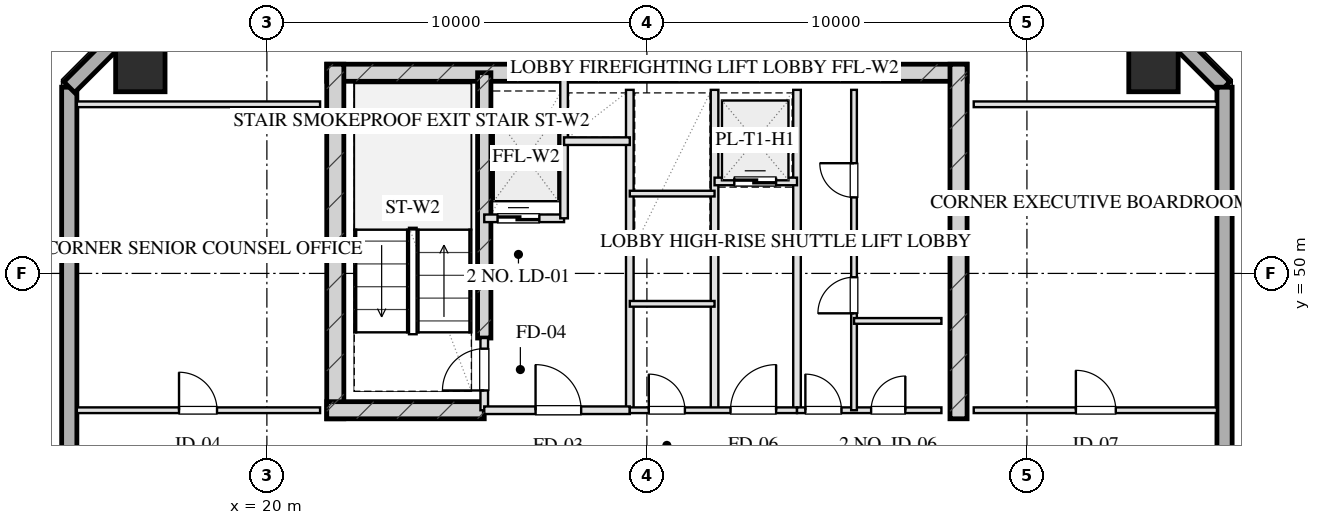
"""IFC4 building model, lengths in metres.
Left out: names, types, materials, properties, quantities, classifications, styles, units other than length and angle.
Written with IfcOpenShell. Run it as: python <this file> out.ifc"""

import sys

from ifc_helpers import new_model, si_unit, direction, frame, frame_2d, origin, origin_2d, place, context, subcontext, project, spatial, rectangle, hollow_rectangle, extrude, element, fill, save


model = new_model("IFC4")
c1 = context("Model", 3, precision=1e-05, world=origin(), true_north=direction((0.0, 1.0)))
c2 = subcontext(c1, "Body", "Model", "MODEL_VIEW")
j1 = project(units=[si_unit("LENGTHUNIT", "METRE"), si_unit("PLANEANGLEUNIT", "RADIAN")], contexts=[c1])
p1 = place(None, origin())
s1 = spatial("IfcSite", under=j1, at=p1, CompositionType="ELEMENT")
p2 = place(p1, origin())
s2 = spatial("IfcBuilding", under=s1, at=p2, CompositionType="ELEMENT")
p3 = place(p2, frame((0.0, 0.0, 250.4)))
s3 = spatial("IfcBuildingStorey", under=s2, at=p3, CompositionType="ELEMENT", Elevation=250.4)
p4 = place(p3, frame((21.575, 55.28, 0.0), z_axis=(0.0, 0.0, 1.0), x_axis=(1.0, 0.0, 0.0)))
e1 = element("IfcWall", 1, at=p4, inside=s3, PredefinedType="SHEAR", context=c2, shape_type="SweptSolid", body=[
    extrude(rectangle(XDim=16.85, YDim=0.45, at=frame_2d((8.425, 0.0))), origin(), (0.0, 0.0, 1.0), 3.2),
])
for number, where, z_axis, x_axis in (
    (2, (21.8, 46.175, 0.0), (0.0, 0.0, 1.0), (0.0, 1.0, 0.0)),
    (3, (38.2, 46.175, 0.0), (0.0, 0.0, 1.0), (0.0, 1.0, 0.0)),
):
    element("IfcWall", number, at=place(p3, frame(where, z_axis=z_axis, x_axis=x_axis)), inside=s3, PredefinedType="SHEAR", context=c2, shape_type="SweptSolid", body=[
        extrude(rectangle(XDim=9.33, YDim=0.45, at=frame_2d((4.665, 0.0))), origin(), (0.0, 0.0, 1.0), 3.2),
    ])
p5 = place(p3, frame((25.72, 48.3, 0.0), z_axis=(0.0, 0.0, 1.0), x_axis=(0.0, 1.0, 0.0)))
e4 = element("IfcWall", 4, at=p5, inside=s3, PredefinedType="SHEAR", context=c2, shape_type="SweptSolid", body=[
    extrude(rectangle(XDim=6.98, YDim=0.35, at=frame_2d((3.49, 0.0))), origin(), (0.0, 0.0, 1.0), 3.2),
])
p6 = place(p3, frame((21.575, 46.4, 0.0), z_axis=(0.0, 0.0, 1.0), x_axis=(1.0, 0.0, 0.0)))
e5 = element("IfcWall", 5, at=p6, inside=s3, PredefinedType="SHEAR", context=c2, shape_type="SweptSolid", body=[
    extrude(rectangle(XDim=4.145, YDim=0.45, at=frame_2d((2.073, 0.0))), origin(), (0.0, 0.0, 1.0), 3.2),
])
for number, where, z_axis, x_axis in (
    (6, (43.33, 55.43, 0.0), (0.0, 0.0, 1.0), (1.0, 0.0, 0.0)),
    (7, (16.67, 55.43, 0.0), (0.0, 0.0, 1.0), (1.0, 0.0, 0.0)),
):
    element("IfcColumn", number, at=place(p3, frame(where, z_axis=z_axis, x_axis=x_axis)), inside=s3, PredefinedType="COLUMN", context=c2, shape_type="SweptSolid", body=[
        extrude(hollow_rectangle(XDim=1.3, YDim=1.3, WallThickness=0.045, at=origin_2d()), origin(), (0.0, 0.0, 1.0), 3.201),
    ])
p7 = place(p3, frame((14.8, 13.1, 0.0), z_axis=(0.0, 0.0, 1.0), x_axis=(0.0, 1.0, 0.0)))
e8 = element("IfcWall", 8, at=p7, inside=s3, PredefinedType="SOLIDWALL", context=c2, shape_type="SweptSolid", body=[
    extrude(rectangle(XDim=41.8, YDim=0.4, at=frame_2d((20.9, 0.0))), origin(), (0.0, 0.0, 1.0), 2.36),
])
p8 = place(p7, frame((22.525, 0.0, 0.75)))
e9 = element("IfcOpeningElement", 9, at=p8, cuts=e8, PredefinedType="OPENING", context=c2, shape_type="SweptSolid", body=[
    extrude(rectangle(XDim=1.95, YDim=1.21, at=frame_2d((0.975, 0.605))), frame((0.0, 0.21, 0.0), z_axis=(0.0, -1.0, 0.0), x_axis=(1.0, 0.0, 0.0)), (0.0, 0.0, 1.0), 0.42),
])
p9 = place(p7, frame((26.325, 0.0, 0.75)))
e10 = element("IfcOpeningElement", 10, at=p9, cuts=e8, PredefinedType="OPENING", context=c2, shape_type="SweptSolid", body=[
    extrude(rectangle(XDim=1.95, YDim=1.21, at=frame_2d((0.975, 0.605))), frame((0.0, 0.21, 0.0), z_axis=(0.0, -1.0, 0.0), x_axis=(1.0, 0.0, 0.0)), (0.0, 0.0, 1.0), 0.42),
])
p10 = place(p7, frame((17.25, 0.0, 0.0)))
e11 = element("IfcOpeningElement", 11, at=p10, cuts=e8, PredefinedType="OPENING", context=c2, shape_type="SweptSolid", body=[
    extrude(rectangle(XDim=1.1, YDim=2.15, at=frame_2d((0.55, 1.075))), frame((0.0, 0.21, 0.0), z_axis=(0.0, -1.0, 0.0), x_axis=(1.0, 0.0, 0.0)), (0.0, 0.0, 1.0), 0.42),
])
for number, where, z_axis, x_axis in (
    (12, (14.8, 54.9, 0.0), (0.0, 0.0, 1.0), (0.707, 0.707, 0.0)),
    (13, (42.8, 57.3, 0.0), (0.0, 0.0, 1.0), (0.707, -0.707, 0.0)),
):
    element("IfcWall", number, at=place(p3, frame(where, z_axis=z_axis, x_axis=x_axis)), inside=s3, PredefinedType="SOLIDWALL", context=c2, shape_type="SweptSolid", body=[
        extrude(rectangle(XDim=3.394, YDim=0.4, at=frame_2d((1.697, 0.0))), origin(), (0.0, 0.0, 1.0), 2.36),
    ])
p11 = place(p3, frame((45.2, 54.9, 0.0), z_axis=(0.0, 0.0, 1.0), x_axis=(0.0, -1.0, 0.0)))
e14 = element("IfcWall", 14, at=p11, inside=s3, PredefinedType="SOLIDWALL", context=c2, shape_type="SweptSolid", body=[
    extrude(rectangle(XDim=41.8, YDim=0.4, at=frame_2d((20.9, 0.0))), origin(), (0.0, 0.0, 1.0), 2.36),
])
p12 = place(p11, frame((17.325, 0.0, 0.75)))
e15 = element("IfcOpeningElement", 15, at=p12, cuts=e14, PredefinedType="OPENING", context=c2, shape_type="SweptSolid", body=[
    extrude(rectangle(XDim=1.95, YDim=1.21, at=frame_2d((0.975, 0.605))), frame((0.0, 0.21, 0.0), z_axis=(0.0, -1.0, 0.0), x_axis=(1.0, 0.0, 0.0)), (0.0, 0.0, 1.0), 0.42),
])
p13 = place(p11, frame((13.525, 0.0, 0.75)))
e16 = element("IfcOpeningElement", 16, at=p13, cuts=e14, PredefinedType="OPENING", context=c2, shape_type="SweptSolid", body=[
    extrude(rectangle(XDim=1.95, YDim=1.21, at=frame_2d((0.975, 0.605))), frame((0.0, 0.21, 0.0), z_axis=(0.0, -1.0, 0.0), x_axis=(1.0, 0.0, 0.0)), (0.0, 0.0, 1.0), 0.42),
])
p14 = place(p11, frame((26.15, 0.0, 0.0)))
e17 = element("IfcOpeningElement", 17, at=p14, cuts=e14, PredefinedType="OPENING", context=c2, shape_type="SweptSolid", body=[
    extrude(rectangle(XDim=1.1, YDim=2.15, at=frame_2d((0.55, 1.075))), frame((0.0, 0.21, 0.0), z_axis=(0.0, -1.0, 0.0), x_axis=(1.0, 0.0, 0.0)), (0.0, 0.0, 1.0), 0.42),
])
p15 = place(p3, frame((25.72, 46.4, 0.0), z_axis=(0.0, 0.0, 1.0), x_axis=(0.0, 1.0, 0.0)))
e18 = element("IfcWall", 18, at=p15, inside=s3, PredefinedType="PARTITIONING", context=c2, shape_type="SweptSolid", body=[
    extrude(rectangle(XDim=1.9, YDim=0.2, at=frame_2d((0.95, 0.0))), origin(), (0.0, 0.0, 1.0), 2.925),
])
p16 = place(p15, frame((0.52, 0.0, 0.0)))
e19 = element("IfcOpeningElement", 19, at=p16, cuts=e18, PredefinedType="OPENING", context=c2, shape_type="SweptSolid", body=[
    extrude(rectangle(XDim=1.1, YDim=2.05, at=frame_2d((0.55, 1.025))), frame((0.0, 0.11, 0.0), z_axis=(0.0, -1.0, 0.0), x_axis=(1.0, 0.0, 0.0)), (0.0, 0.0, 1.0), 0.22),
])
p17 = place(p3, frame((29.55, 46.4, 0.0), z_axis=(0.0, 0.0, 1.0), x_axis=(0.0, 1.0, 0.0)))
e20 = element("IfcWall", 20, at=p17, inside=s3, PredefinedType="PARTITIONING", context=c2, shape_type="SweptSolid", body=[
    extrude(rectangle(XDim=8.43, YDim=0.2, at=frame_2d((4.215, 0.0))), origin(), (0.0, 0.0, 1.0), 2.925),
])
p18 = place(p3, frame((25.72, 46.4, 0.0), z_axis=(0.0, 0.0, 1.0), x_axis=(1.0, 0.0, 0.0)))
e21 = element("IfcWall", 21, at=p18, inside=s3, PredefinedType="PARTITIONING", context=c2, shape_type="SweptSolid", body=[
    extrude(rectangle(XDim=3.83, YDim=0.2, at=frame_2d((1.915, 0.0))), origin(), (0.0, 0.0, 1.0), 2.925),
])
p19 = place(p18, frame((1.35, 0.0, 0.0)))
e22 = element("IfcOpeningElement", 22, at=p19, cuts=e21, PredefinedType="OPENING", context=c2, shape_type="SweptSolid", body=[
    extrude(rectangle(XDim=1.2, YDim=2.05, at=frame_2d((0.6, 1.025))), frame((0.0, 0.11, 0.0), z_axis=(0.0, -1.0, 0.0), x_axis=(1.0, 0.0, 0.0)), (0.0, 0.0, 1.0), 0.22),
])
p20 = place(p3, frame((25.72, 51.45, 0.0), z_axis=(0.0, 0.0, 1.0), x_axis=(1.0, 0.0, 0.0)))
e23 = element("IfcWall", 23, at=p20, inside=s3, PredefinedType="PARTITIONING", context=c2, shape_type="SweptSolid", body=[
    extrude(rectangle(XDim=2.1, YDim=0.2, at=frame_2d((1.05, 0.0))), origin(), (0.0, 0.0, 1.0), 2.925),
])
p21 = place(p20, frame((0.35, 0.0, 0.0)))
e24 = element("IfcOpeningElement", 24, at=p21, cuts=e23, PredefinedType="OPENING", context=c2, shape_type="SweptSolid", body=[
    extrude(rectangle(XDim=1.1, YDim=2.05, at=frame_2d((0.55, 1.025))), frame((0.0, 0.11, 0.0), z_axis=(0.0, -1.0, 0.0), x_axis=(1.0, 0.0, 0.0)), (0.0, 0.0, 1.0), 0.22),
])
p22 = place(p3, frame((27.82, 51.45, 0.0), z_axis=(0.0, 0.0, 1.0), x_axis=(0.0, 1.0, 0.0)))
e25 = element("IfcWall", 25, at=p22, inside=s3, PredefinedType="PARTITIONING", context=c2, shape_type="SweptSolid", body=[
    extrude(rectangle(XDim=3.7, YDim=0.2, at=frame_2d((1.85, 0.0))), origin(), (0.0, 0.0, 1.0), 2.925),
])
p23 = place(p3, frame((27.82, 53.48, 0.0), z_axis=(0.0, 0.0, 1.0), x_axis=(1.0, 0.0, 0.0)))
e26 = element("IfcWall", 26, at=p23, inside=s3, PredefinedType="PARTITIONING", context=c2, shape_type="SweptSolid", body=[
    extrude(rectangle(XDim=1.73, YDim=0.2, at=frame_2d((0.865, 0.0))), origin(), (0.0, 0.0, 1.0), 2.925),
])
for number, where, z_axis, x_axis in (
    (27, (33.95, 46.4, 0.0), (0.0, 0.0, 1.0), (0.0, 1.0, 0.0)),
    (28, (31.78, 46.4, 0.0), (0.0, 0.0, 1.0), (0.0, 1.0, 0.0)),
):
    element("IfcWall", number, at=place(p3, frame(where, z_axis=z_axis, x_axis=x_axis)), inside=s3, PredefinedType="PARTITIONING", context=c2, shape_type="SweptSolid", body=[
        extrude(rectangle(XDim=8.43, YDim=0.2, at=frame_2d((4.215, 0.0))), origin(), (0.0, 0.0, 1.0), 2.925),
    ])
p24 = place(p3, frame((29.55, 46.4, 0.0), z_axis=(0.0, 0.0, 1.0), x_axis=(1.0, 0.0, 0.0)))
e29 = element("IfcWall", 29, at=p24, inside=s3, PredefinedType="PARTITIONING", context=c2, shape_type="SweptSolid", body=[
    extrude(rectangle(XDim=4.4, YDim=0.15, at=frame_2d((2.2, 0.0))), origin(), (0.0, 0.0, 1.0), 2.925),
])
p25 = place(p24, frame((0.5, 0.0, 0.0)))
e30 = element("IfcOpeningElement", 30, at=p25, cuts=e29, PredefinedType="OPENING", context=c2, shape_type="SweptSolid", body=[
    extrude(rectangle(XDim=0.95, YDim=2.05, at=frame_2d((0.475, 1.025))), frame((0.0, 0.085, 0.0), z_axis=(0.0, -1.0, 0.0), x_axis=(1.0, 0.0, 0.0)), (0.0, 0.0, 1.0), 0.17),
])
p26 = place(p24, frame((2.65, 0.0, 0.0)))
e31 = element("IfcOpeningElement", 31, at=p26, cuts=e29, PredefinedType="OPENING", context=c2, shape_type="SweptSolid", body=[
    extrude(rectangle(XDim=1.2, YDim=2.05, at=frame_2d((0.6, 1.025))), frame((0.0, 0.085, 0.0), z_axis=(0.0, -1.0, 0.0), x_axis=(1.0, 0.0, 0.0)), (0.0, 0.0, 1.0), 0.17),
])
for number, where, z_axis, x_axis in (
    (32, (29.55, 49.2, 0.0), (0.0, 0.0, 1.0), (1.0, 0.0, 0.0)),
    (33, (29.55, 52.1, 0.0), (0.0, 0.0, 1.0), (1.0, 0.0, 0.0)),
):
    element("IfcWall", number, at=place(p3, frame(where, z_axis=z_axis, x_axis=x_axis)), inside=s3, PredefinedType="PARTITIONING", context=c2, shape_type="SweptSolid", body=[
        extrude(rectangle(XDim=2.23, YDim=0.15, at=frame_2d((1.115, 0.0))), origin(), (0.0, 0.0, 1.0), 2.925),
    ])
p27 = place(p3, frame((31.78, 52.42, 0.0), z_axis=(0.0, 0.0, 1.0), x_axis=(1.0, 0.0, 0.0)))
e34 = element("IfcWall", 34, at=p27, inside=s3, PredefinedType="PARTITIONING", context=c2, shape_type="SweptSolid", body=[
    extrude(rectangle(XDim=2.17, YDim=0.2, at=frame_2d((1.085, 0.0))), origin(), (0.0, 0.0, 1.0), 2.925),
])
p28 = place(p27, frame((0.52, 0.0, 0.0)))
e35 = element("IfcOpeningElement", 35, at=p28, cuts=e34, PredefinedType="OPENING", context=c2, shape_type="SweptSolid", body=[
    extrude(rectangle(XDim=1.1, YDim=2.05, at=frame_2d((0.55, 1.025))), frame((0.0, 0.11, 0.0), z_axis=(0.0, -1.0, 0.0), x_axis=(1.0, 0.0, 0.0)), (0.0, 0.0, 1.0), 0.22),
])
p29 = place(p3, frame((33.95, 46.4, 0.0), z_axis=(0.0, 0.0, 1.0), x_axis=(1.0, 0.0, 0.0)))
e36 = element("IfcWall", 36, at=p29, inside=s3, PredefinedType="PARTITIONING", context=c2, shape_type="SweptSolid", body=[
    extrude(rectangle(XDim=3.8, YDim=0.15, at=frame_2d((1.9, 0.0))), origin(), (0.0, 0.0, 1.0), 2.925),
])
p30 = place(p29, frame((0.22, 0.0, 0.0)))
e37 = element("IfcOpeningElement", 37, at=p30, cuts=e36, PredefinedType="OPENING", context=c2, shape_type="SweptSolid", body=[
    extrude(rectangle(XDim=0.95, YDim=2.05, at=frame_2d((0.475, 1.025))), frame((0.0, 0.085, 0.0), z_axis=(0.0, -1.0, 0.0), x_axis=(1.0, 0.0, 0.0)), (0.0, 0.0, 1.0), 0.17),
])
p31 = place(p29, frame((1.95, 0.0, 0.0)))
e38 = element("IfcOpeningElement", 38, at=p31, cuts=e36, PredefinedType="OPENING", context=c2, shape_type="SweptSolid", body=[
    extrude(rectangle(XDim=0.9, YDim=2.05, at=frame_2d((0.45, 1.025))), frame((0.0, 0.085, 0.0), z_axis=(0.0, -1.0, 0.0), x_axis=(1.0, 0.0, 0.0)), (0.0, 0.0, 1.0), 0.17),
])
p32 = place(p3, frame((35.45, 46.4, 0.0), z_axis=(0.0, 0.0, 1.0), x_axis=(0.0, 1.0, 0.0)))
e39 = element("IfcWall", 39, at=p32, inside=s3, PredefinedType="PARTITIONING", context=c2, shape_type="SweptSolid", body=[
    extrude(rectangle(XDim=8.43, YDim=0.15, at=frame_2d((4.215, 0.0))), origin(), (0.0, 0.0, 1.0), 2.515),
])
p33 = place(p32, frame((2.55, 0.0, 0.0)))
e40 = element("IfcOpeningElement", 40, at=p33, cuts=e39, PredefinedType="OPENING", context=c2, shape_type="SweptSolid", body=[
    extrude(rectangle(XDim=0.95, YDim=2.05, at=frame_2d((0.475, 1.025))), frame((0.0, 0.085, 0.0), z_axis=(0.0, -1.0, 0.0), x_axis=(1.0, 0.0, 0.0)), (0.0, 0.0, 1.0), 0.17),
])
p34 = place(p32, frame((5.6, 0.0, 0.0)))
e41 = element("IfcOpeningElement", 41, at=p34, cuts=e39, PredefinedType="OPENING", context=c2, shape_type="SweptSolid", body=[
    extrude(rectangle(XDim=0.9, YDim=2.05, at=frame_2d((0.45, 1.025))), frame((0.0, 0.085, 0.0), z_axis=(0.0, -1.0, 0.0), x_axis=(1.0, 0.0, 0.0)), (0.0, 0.0, 1.0), 0.17),
])
for number, where, z_axis, x_axis in (
    (42, (35.45, 50.8, 0.0), (0.0, 0.0, 1.0), (1.0, 0.0, 0.0)),
    (43, (35.45, 48.75, 0.0), (0.0, 0.0, 1.0), (1.0, 0.0, 0.0)),
):
    element("IfcWall", number, at=place(p3, frame(where, z_axis=z_axis, x_axis=x_axis)), inside=s3, PredefinedType="PARTITIONING", context=c2, shape_type="SweptSolid", body=[
        extrude(rectangle(XDim=2.3, YDim=0.15, at=frame_2d((1.15, 0.0))), origin(), (0.0, 0.0, 1.0), 2.925),
    ])
p35 = place(p3, frame((15.0, 54.45, 0.0), z_axis=(0.0, 0.0, 1.0), x_axis=(1.0, 0.0, 0.0)))
e44 = element("IfcWall", 44, at=p35, inside=s3, PredefinedType="PARTITIONING", context=c2, shape_type="SweptSolid", body=[
    extrude(rectangle(XDim=6.4, YDim=0.15, at=frame_2d((3.2, 0.0))), origin(), (0.0, 0.0, 1.0), 2.925),
])
p36 = place(p3, frame((15.0, 46.4, 0.0), z_axis=(0.0, 0.0, 1.0), x_axis=(1.0, 0.0, 0.0)))
e45 = element("IfcWall", 45, at=p36, inside=s3, PredefinedType="PARTITIONING", context=c2, shape_type="SweptSolid", body=[
    extrude(rectangle(XDim=6.4, YDim=0.15, at=frame_2d((3.2, 0.0))), origin(), (0.0, 0.0, 1.0), 2.925),
])
p37 = place(p36, frame((2.688, 0.0, 0.0)))
e46 = element("IfcOpeningElement", 46, at=p37, cuts=e45, PredefinedType="OPENING", context=c2, shape_type="SweptSolid", body=[
    extrude(rectangle(XDim=1.0, YDim=2.05, at=frame_2d((0.5, 1.025))), frame((0.0, 0.085, 0.0), z_axis=(0.0, -1.0, 0.0), x_axis=(1.0, 0.0, 0.0)), (0.0, 0.0, 1.0), 0.17),
])
p38 = place(p3, frame((38.6, 54.45, 0.0), z_axis=(0.0, 0.0, 1.0), x_axis=(1.0, 0.0, 0.0)))
e47 = element("IfcWall", 47, at=p38, inside=s3, PredefinedType="PARTITIONING", context=c2, shape_type="SweptSolid", body=[
    extrude(rectangle(XDim=6.4, YDim=0.15, at=frame_2d((3.2, 0.0))), origin(), (0.0, 0.0, 1.0), 2.925),
])
p39 = place(p3, frame((38.6, 46.4, 0.0), z_axis=(0.0, 0.0, 1.0), x_axis=(1.0, 0.0, 0.0)))
e48 = element("IfcWall", 48, at=p39, inside=s3, PredefinedType="PARTITIONING", context=c2, shape_type="SweptSolid", body=[
    extrude(rectangle(XDim=6.4, YDim=0.15, at=frame_2d((3.2, 0.0))), origin(), (0.0, 0.0, 1.0), 2.925),
])
p40 = place(p39, frame((2.688, 0.0, 0.0)))
e49 = element("IfcOpeningElement", 49, at=p40, cuts=e48, PredefinedType="OPENING", context=c2, shape_type="SweptSolid", body=[
    extrude(rectangle(XDim=1.05, YDim=2.05, at=frame_2d((0.525, 1.025))), frame((0.0, 0.085, 0.0), z_axis=(0.0, -1.0, 0.0), x_axis=(1.0, 0.0, 0.0)), (0.0, 0.0, 1.0), 0.17),
])
p41 = place(p16, origin())
e50 = element("IfcDoor", 50, at=p41, inside=s3, OperationType="SINGLE_SWING_LEFT", PredefinedType="DOOR", context=c2, shape_type="SweptSolid", body=[
    extrude(rectangle(XDim=1.1, YDim=2.05, at=frame_2d((0.55, 1.025))), frame((0.0, 0.025, 0.0), z_axis=(0.0, -1.0, 0.0), x_axis=(1.0, 0.0, 0.0)), (0.0, 0.0, 1.0), 0.05),
])
fill(e19, e50)
p42 = place(p19, origin())
e51 = element("IfcDoor", 51, at=p42, inside=s3, OperationType="SINGLE_SWING_LEFT", PredefinedType="DOOR", context=c2, shape_type="SweptSolid", body=[
    extrude(rectangle(XDim=1.2, YDim=2.05, at=frame_2d((0.6, 1.025))), frame((0.0, 0.025, 0.0), z_axis=(0.0, -1.0, 0.0), x_axis=(1.0, 0.0, 0.0)), (0.0, 0.0, 1.0), 0.05),
])
fill(e22, e51)
p43 = place(p21, origin())
e52 = element("IfcDoor", 52, at=p43, inside=s3, OperationType="DOUBLE_DOOR_SLIDING", PredefinedType="DOOR", context=c2, shape_type="SweptSolid", body=[
    extrude(rectangle(XDim=1.1, YDim=2.05, at=frame_2d((0.55, 1.025))), frame((0.0, 0.025, 0.0), z_axis=(0.0, -1.0, 0.0), x_axis=(1.0, 0.0, 0.0)), (0.0, 0.0, 1.0), 0.05),
])
fill(e24, e52)
p44 = place(p25, origin())
e53 = element("IfcDoor", 53, at=p44, inside=s3, OperationType="SINGLE_SWING_LEFT", PredefinedType="DOOR", context=c2, shape_type="SweptSolid", body=[
    extrude(rectangle(XDim=0.95, YDim=2.05, at=frame_2d((0.475, 1.025))), frame((0.0, 0.025, 0.0), z_axis=(0.0, -1.0, 0.0), x_axis=(1.0, 0.0, 0.0)), (0.0, 0.0, 1.0), 0.05),
])
fill(e30, e53)
p45 = place(p26, origin())
e54 = element("IfcDoor", 54, at=p45, inside=s3, OperationType="SINGLE_SWING_RIGHT", PredefinedType="DOOR", context=c2, shape_type="SweptSolid", body=[
    extrude(rectangle(XDim=1.2, YDim=2.05, at=frame_2d((0.6, 1.025))), frame((0.0, 0.025, 0.0), z_axis=(0.0, -1.0, 0.0), x_axis=(1.0, 0.0, 0.0)), (0.0, 0.0, 1.0), 0.05),
])
fill(e31, e54)
p46 = place(p28, origin())
e55 = element("IfcDoor", 55, at=p46, inside=s3, OperationType="DOUBLE_DOOR_SLIDING", PredefinedType="DOOR", context=c2, shape_type="SweptSolid", body=[
    extrude(rectangle(XDim=1.1, YDim=2.05, at=frame_2d((0.55, 1.025))), frame((0.0, 0.025, 0.0), z_axis=(0.0, -1.0, 0.0), x_axis=(1.0, 0.0, 0.0)), (0.0, 0.0, 1.0), 0.05),
])
fill(e35, e55)
p47 = place(p30, origin())
e56 = element("IfcDoor", 56, at=p47, inside=s3, OperationType="SINGLE_SWING_LEFT", PredefinedType="DOOR", context=c2, shape_type="SweptSolid", body=[
    extrude(rectangle(XDim=0.95, YDim=2.05, at=frame_2d((0.475, 1.025))), frame((0.0, 0.025, 0.0), z_axis=(0.0, -1.0, 0.0), x_axis=(1.0, 0.0, 0.0)), (0.0, 0.0, 1.0), 0.05),
])
fill(e37, e56)
p48 = place(p31, origin())
e57 = element("IfcDoor", 57, at=p48, inside=s3, OperationType="SINGLE_SWING_RIGHT", PredefinedType="DOOR", context=c2, shape_type="SweptSolid", body=[
    extrude(rectangle(XDim=0.9, YDim=2.05, at=frame_2d((0.45, 1.025))), frame((0.0, 0.025, 0.0), z_axis=(0.0, -1.0, 0.0), x_axis=(1.0, 0.0, 0.0)), (0.0, 0.0, 1.0), 0.05),
])
fill(e38, e57)
p49 = place(p33, origin())
e58 = element("IfcDoor", 58, at=p49, inside=s3, OperationType="SINGLE_SWING_LEFT", PredefinedType="DOOR", context=c2, shape_type="SweptSolid", body=[
    extrude(rectangle(XDim=0.95, YDim=2.05, at=frame_2d((0.475, 1.025))), frame((0.0, 0.025, 0.0), z_axis=(0.0, -1.0, 0.0), x_axis=(1.0, 0.0, 0.0)), (0.0, 0.0, 1.0), 0.05),
])
fill(e40, e58)
p50 = place(p34, origin())
e59 = element("IfcDoor", 59, at=p50, inside=s3, OperationType="SINGLE_SWING_RIGHT", PredefinedType="DOOR", context=c2, shape_type="SweptSolid", body=[
    extrude(rectangle(XDim=0.9, YDim=2.05, at=frame_2d((0.45, 1.025))), frame((0.0, 0.025, 0.0), z_axis=(0.0, -1.0, 0.0), x_axis=(1.0, 0.0, 0.0)), (0.0, 0.0, 1.0), 0.05),
])
fill(e41, e59)
p51 = place(p37, origin())
e60 = element("IfcDoor", 60, at=p51, inside=s3, OperationType="SINGLE_SWING_LEFT", PredefinedType="DOOR", context=c2, shape_type="SweptSolid", body=[
    extrude(rectangle(XDim=1.0, YDim=2.05, at=frame_2d((0.5, 1.025))), frame((0.0, 0.025, 0.0), z_axis=(0.0, -1.0, 0.0), x_axis=(1.0, 0.0, 0.0)), (0.0, 0.0, 1.0), 0.05),
])
fill(e46, e60)
p52 = place(p40, origin())
e61 = element("IfcDoor", 61, at=p52, inside=s3, OperationType="SINGLE_SWING_LEFT", PredefinedType="DOOR", context=c2, shape_type="SweptSolid", body=[
    extrude(rectangle(XDim=1.05, YDim=2.05, at=frame_2d((0.525, 1.025))), frame((0.0, 0.025, 0.0), z_axis=(0.0, -1.0, 0.0), x_axis=(1.0, 0.0, 0.0)), (0.0, 0.0, 1.0), 0.05),
])
fill(e49, e61)
save(model, sys.argv[1])
